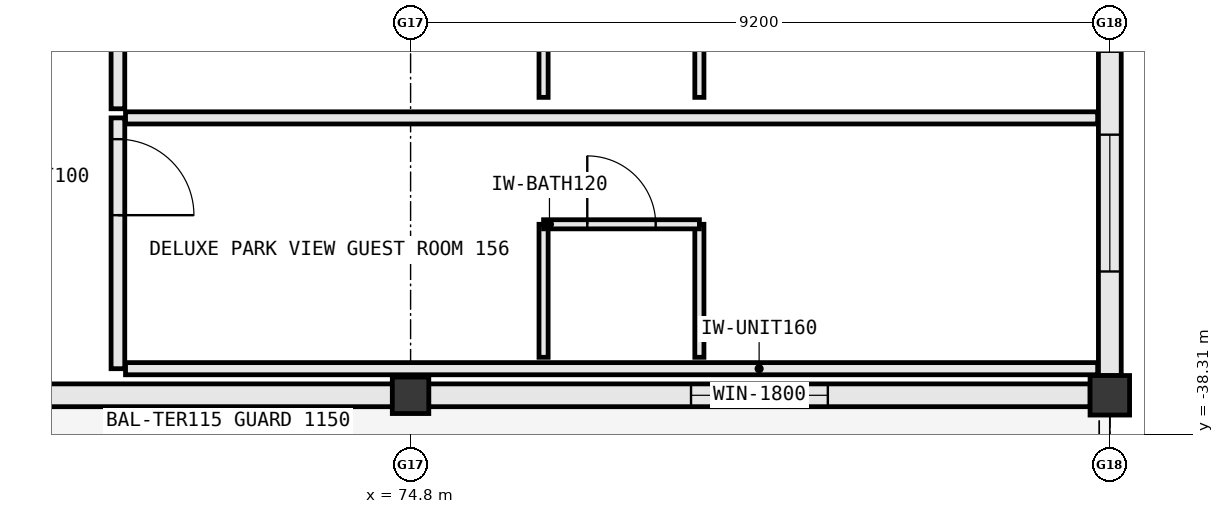
"""IFC4 building model, lengths in metres.
Left out: names, types, materials, properties, quantities, classifications, styles, units other than length and angle.
Written with IfcOpenShell. Run it as: python <this file> out.ifc"""

import sys

from ifc_helpers import new_model, si_unit, direction, frame, frame_2d, origin, origin_2d, place, context, subcontext, project, spatial, rectangle, extrude, element, fill, save


model = new_model("IFC4")
c1 = context("Model", 3, precision=1e-05, world=origin(), true_north=direction((0.0, 1.0)))
c2 = subcontext(c1, "Body", "Model", "MODEL_VIEW")
j1 = project(units=[si_unit("LENGTHUNIT", "METRE"), si_unit("PLANEANGLEUNIT", "RADIAN")], contexts=[c1])
p1 = place(None, origin())
s1 = spatial("IfcSite", under=j1, at=p1, CompositionType="ELEMENT")
p2 = place(p1, origin())
s2 = spatial("IfcBuilding", under=s1, at=p2, CompositionType="ELEMENT")
p3 = place(p2, frame((0.0, 0.0, 23.8)))
s3 = spatial("IfcBuildingStorey", under=s2, at=p3, CompositionType="ELEMENT", Elevation=23.8)
p4 = place(p3, frame((74.8, -37.8, 0.0), z_axis=(0.0, 0.0, 1.0), x_axis=(1.0, 0.0, 0.0)))
e1 = element("IfcColumn", 1, at=p4, inside=s3, PredefinedType="COLUMN", context=c2, shape_type="SweptSolid", body=[
    extrude(rectangle(XDim=0.48, YDim=0.48, at=origin_2d()), origin(), (0.0, 0.0, 1.0), 3.8),
])
p5 = place(p3, frame((84.0, -37.8, 0.0), z_axis=(0.0, 0.0, 1.0), x_axis=(1.0, 0.0, 0.0)))
e2 = element("IfcColumn", 2, at=p5, inside=s3, PredefinedType="COLUMN", context=c2, shape_type="SweptSolid", body=[
    extrude(rectangle(XDim=0.52, YDim=0.52, at=origin_2d()), origin(), (0.0, 0.0, 1.0), 3.8),
])
p6 = place(p3, frame((67.808, -37.8, 0.0), z_axis=(0.0, 0.0, 1.0), x_axis=(1.0, 0.0, 0.0)))
e3 = element("IfcWall", 3, at=p6, inside=s3, PredefinedType="STANDARD", context=c2, shape_type="SweptSolid", body=[
    extrude(rectangle(XDim=6.754, YDim=0.3, at=frame_2d((3.377, 0.0))), origin(), (0.0, 0.0, 1.0), 2.685),
])
p7 = place(p3, frame((75.038, -37.8, 0.0), z_axis=(0.0, 0.0, 1.0), x_axis=(1.0, 0.0, 0.0)))
e4 = element("IfcWall", 4, at=p7, inside=s3, PredefinedType="STANDARD", context=c2, shape_type="SweptSolid", body=[
    extrude(rectangle(XDim=8.704, YDim=0.3, at=frame_2d((4.352, 0.0))), origin(), (0.0, 0.0, 1.0), 2.905),
])
p8 = place(p7, frame((3.452, 0.0, 0.85)))
e5 = element("IfcOpeningElement", 5, at=p8, cuts=e4, PredefinedType="OPENING", context=c2, shape_type="SweptSolid", body=[
    extrude(rectangle(XDim=1.8, YDim=1.85, at=frame_2d((0.9, 0.925))), frame((0.0, 0.162, 0.0), z_axis=(0.0, -1.0, 0.0), x_axis=(1.0, 0.0, 0.0)), (0.0, 0.0, 1.0), 0.324),
])
p9 = place(p3, frame((84.0, -37.542, 0.0), z_axis=(0.0, 0.0, 1.0), x_axis=(0.0, 1.0, 0.0)))
e6 = element("IfcWall", 6, at=p9, inside=s3, PredefinedType="STANDARD", context=c2, shape_type="SweptSolid", body=[
    extrude(rectangle(XDim=9.084, YDim=0.3, at=frame_2d((4.542, 0.0))), origin(), (0.0, 0.0, 1.0), 2.965),
])
p10 = place(p9, frame((1.371, 0.0, 0.85)))
e7 = element("IfcOpeningElement", 7, at=p10, cuts=e6, PredefinedType="OPENING", context=c2, shape_type="SweptSolid", body=[
    extrude(rectangle(XDim=1.8, YDim=1.85, at=frame_2d((0.9, 0.925))), frame((0.0, 0.162, 0.0), z_axis=(0.0, -1.0, 0.0), x_axis=(1.0, 0.0, 0.0)), (0.0, 0.0, 1.0), 0.324),
])
p11 = place(p9, frame((4.262, 0.0, 0.85)))
e8 = element("IfcOpeningElement", 8, at=p11, cuts=e6, PredefinedType="OPENING", context=c2, shape_type="SweptSolid", body=[
    extrude(rectangle(XDim=1.8, YDim=1.85, at=frame_2d((0.9, 0.925))), frame((0.0, 0.162, 0.0), z_axis=(0.0, -1.0, 0.0), x_axis=(1.0, 0.0, 0.0)), (0.0, 0.0, 1.0), 0.324),
])
p12 = place(p9, frame((7.108, 0.0, 0.85)))
e9 = element("IfcOpeningElement", 9, at=p12, cuts=e6, PredefinedType="OPENING", context=c2, shape_type="SweptSolid", body=[
    extrude(rectangle(XDim=1.8, YDim=1.85, at=frame_2d((0.9, 0.925))), frame((0.0, 0.162, 0.0), z_axis=(0.0, -1.0, 0.0), x_axis=(1.0, 0.0, 0.0)), (0.0, 0.0, 1.0), 0.324),
])
p13 = place(p3, frame((70.95, -34.15, 0.0), z_axis=(0.0, 0.0, 1.0), x_axis=(0.0, -1.0, 0.0)))
e10 = element("IfcWall", 10, at=p13, inside=s3, PredefinedType="PARTITIONING", context=c2, shape_type="SweptSolid", body=[
    extrude(rectangle(XDim=3.3, YDim=0.18, at=frame_2d((1.65, 0.0))), origin(), (0.0, 0.0, 1.0), 3.55),
])
p14 = place(p13, frame((0.28, 0.0, 0.0)))
e11 = element("IfcOpeningElement", 11, at=p14, cuts=e10, PredefinedType="OPENING", context=c2, shape_type="SweptSolid", body=[
    extrude(rectangle(XDim=1.0, YDim=2.2, at=frame_2d((0.5, 1.1))), frame((0.0, 0.102, 0.0), z_axis=(0.0, -1.0, 0.0), x_axis=(1.0, 0.0, 0.0)), (0.0, 0.0, 1.0), 0.204),
])
p15 = place(p3, frame((71.05, -37.45, 0.0), z_axis=(0.0, 0.0, 1.0), x_axis=(1.0, 0.0, 0.0)))
e12 = element("IfcWall", 12, at=p15, inside=s3, PredefinedType="PARTITIONING", context=c2, shape_type="SweptSolid", body=[
    extrude(rectangle(XDim=12.79, YDim=0.16, at=frame_2d((6.395, 0.0))), origin(), (0.0, 0.0, 1.0), 2.685),
])
p16 = place(p3, frame((71.05, -34.15, 0.0), z_axis=(0.0, 0.0, 1.0), x_axis=(1.0, 0.0, 0.0)))
e13 = element("IfcWall", 13, at=p16, inside=s3, PredefinedType="PARTITIONING", context=c2, shape_type="SweptSolid", body=[
    extrude(rectangle(XDim=12.79, YDim=0.16, at=frame_2d((6.395, 0.0))), origin(), (0.0, 0.0, 1.0), 3.55),
])
for number, where, z_axis, x_axis in (
    (14, (76.55, -37.3, 0.0), (0.0, 0.0, 1.0), (0.0, 1.0, 0.0)),
    (15, (78.6, -37.3, 0.0), (0.0, 0.0, 1.0), (0.0, 1.0, 0.0)),
):
    element("IfcWall", number, at=place(p3, frame(where, z_axis=z_axis, x_axis=x_axis)), inside=s3, PredefinedType="PARTITIONING", context=c2, shape_type="SweptSolid", body=[
        extrude(rectangle(XDim=1.75, YDim=0.12, at=frame_2d((0.875, 0.0))), origin(), (0.0, 0.0, 1.0), 3.55),
    ])
p17 = place(p3, frame((76.55, -35.55, 0.0), z_axis=(0.0, 0.0, 1.0), x_axis=(1.0, 0.0, 0.0)))
e16 = element("IfcWall", 16, at=p17, inside=s3, PredefinedType="PARTITIONING", context=c2, shape_type="SweptSolid", body=[
    extrude(rectangle(XDim=2.05, YDim=0.12, at=frame_2d((1.025, 0.0))), origin(), (0.0, 0.0, 1.0), 3.55),
])
p18 = place(p17, frame((0.575, 0.0, 0.0)))
e17 = element("IfcOpeningElement", 17, at=p18, cuts=e16, PredefinedType="OPENING", context=c2, shape_type="SweptSolid", body=[
    extrude(rectangle(XDim=0.9, YDim=2.15, at=frame_2d((0.45, 1.075))), frame((0.0, 0.072, 0.0), z_axis=(0.0, -1.0, 0.0), x_axis=(1.0, 0.0, 0.0)), (0.0, 0.0, 1.0), 0.144),
])
p19 = place(p3, frame((70.95, -30.73, 0.0), z_axis=(0.0, 0.0, 1.0), x_axis=(0.0, -1.0, 0.0)))
e18 = element("IfcWall", 18, at=p19, inside=s3, PredefinedType="PARTITIONING", context=c2, shape_type="SweptSolid", body=[
    extrude(rectangle(XDim=3.3, YDim=0.18, at=frame_2d((1.65, 0.0))), origin(), (0.0, 0.0, 1.0), 3.55),
])
p20 = place(p19, frame((0.28, 0.0, 0.0)))
e19 = element("IfcOpeningElement", 19, at=p20, cuts=e18, PredefinedType="OPENING", context=c2, shape_type="SweptSolid", body=[
    extrude(rectangle(XDim=1.0, YDim=2.2, at=frame_2d((0.5, 1.1))), frame((0.0, 0.102, 0.0), z_axis=(0.0, -1.0, 0.0), x_axis=(1.0, 0.0, 0.0)), (0.0, 0.0, 1.0), 0.204),
])
for number, where, z_axis, x_axis in (
    (20, (76.55, -33.88, 0.0), (0.0, 0.0, 1.0), (0.0, 1.0, 0.0)),
    (21, (78.6, -33.88, 0.0), (0.0, 0.0, 1.0), (0.0, 1.0, 0.0)),
):
    element("IfcWall", number, at=place(p3, frame(where, z_axis=z_axis, x_axis=x_axis)), inside=s3, PredefinedType="PARTITIONING", context=c2, shape_type="SweptSolid", body=[
        extrude(rectangle(XDim=1.75, YDim=0.12, at=frame_2d((0.875, 0.0))), origin(), (0.0, 0.0, 1.0), 3.55),
    ])
p21 = place(p8, origin())
e22 = element("IfcWindow", 22, at=p21, inside=s3, PartitioningType="SINGLE_PANEL", PredefinedType="WINDOW", context=c2, shape_type="SweptSolid", body=[
    extrude(rectangle(XDim=1.8, YDim=1.85, at=frame_2d((0.9, 0.925))), frame((0.0, 0.03, 0.0), z_axis=(0.0, -1.0, 0.0), x_axis=(1.0, 0.0, 0.0)), (0.0, 0.0, 1.0), 0.06),
])
fill(e5, e22)
p22 = place(p10, origin())
e23 = element("IfcWindow", 23, at=p22, inside=s3, PartitioningType="SINGLE_PANEL", PredefinedType="WINDOW", context=c2, shape_type="SweptSolid", body=[
    extrude(rectangle(XDim=1.8, YDim=1.85, at=frame_2d((0.9, 0.925))), frame((0.0, 0.03, 0.0), z_axis=(0.0, -1.0, 0.0), x_axis=(1.0, 0.0, 0.0)), (0.0, 0.0, 1.0), 0.06),
])
fill(e7, e23)
p23 = place(p14, origin())
e24 = element("IfcDoor", 24, at=p23, inside=s3, OperationType="SINGLE_SWING_RIGHT", PredefinedType="DOOR", context=c2, shape_type="SweptSolid", body=[
    extrude(rectangle(XDim=1.0, YDim=2.2, at=frame_2d((0.5, 1.1))), frame((0.0, 0.025, 0.0), z_axis=(0.0, -1.0, 0.0), x_axis=(1.0, 0.0, 0.0)), (0.0, 0.0, 1.0), 0.05),
])
fill(e11, e24)
p24 = place(p18, origin())
e25 = element("IfcDoor", 25, at=p24, inside=s3, OperationType="SINGLE_SWING_LEFT", PredefinedType="DOOR", context=c2, shape_type="SweptSolid", body=[
    extrude(rectangle(XDim=0.9, YDim=2.15, at=frame_2d((0.45, 1.075))), frame((0.0, 0.025, 0.0), z_axis=(0.0, -1.0, 0.0), x_axis=(1.0, 0.0, 0.0)), (0.0, 0.0, 1.0), 0.05),
])
fill(e17, e25)
save(model, sys.argv[1])
